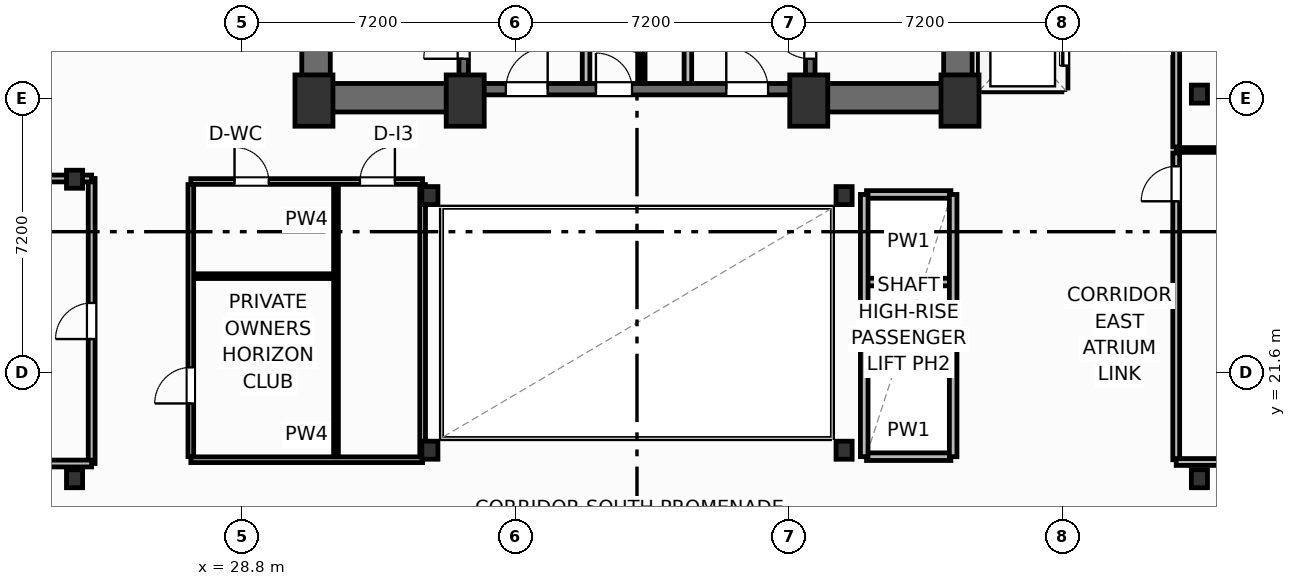
"""IFC4 building model, lengths in metres.
Left out: names, types, materials, properties, quantities, classifications, styles, units other than length and angle.
Written with IfcOpenShell. Run it as: python <this file> out.ifc"""

import sys

from ifc_helpers import new_model, si_unit, direction, frame, frame_2d, origin, origin_2d, place, context, subcontext, project, spatial, rectangle, i_section, extrude, element, fill, save


model = new_model("IFC4")
c1 = context("Model", 3, precision=1e-05, world=origin(), true_north=direction((0.0, 1.0)))
c2 = subcontext(c1, "Body", "Model", "MODEL_VIEW")
j1 = project(units=[si_unit("LENGTHUNIT", "METRE"), si_unit("PLANEANGLEUNIT", "RADIAN")], contexts=[c1])
p1 = place(None, origin())
s1 = spatial("IfcSite", under=j1, at=p1, CompositionType="ELEMENT")
p2 = place(p1, origin())
s2 = spatial("IfcBuilding", under=s1, at=p2, CompositionType="ELEMENT")
p3 = place(p2, frame((0.0, 0.0, 121.7)))
s3 = spatial("IfcBuildingStorey", under=s2, at=p3, CompositionType="ELEMENT", Elevation=121.7)
for number, where, z_axis, x_axis in (
    (1, (30.7, 28.75, 0.0), (0.0, 0.0, 1.0), (1.0, 0.0, 0.0)),
    (2, (34.68, 28.75, 0.0), (0.0, 0.0, 1.0), (1.0, 0.0, 0.0)),
    (3, (43.72, 28.75, 0.0), (0.0, 0.0, 1.0), (1.0, 0.0, 0.0)),
    (4, (47.7, 28.75, 0.0), (0.0, 0.0, 1.0), (1.0, 0.0, 0.0)),
):
    element("IfcColumn", number, at=place(p3, frame(where, z_axis=z_axis, x_axis=x_axis)), inside=s3, PredefinedType="COLUMN", context=c2, shape_type="SweptSolid", body=[
        extrude(rectangle(XDim=1.0, YDim=1.35, at=origin_2d()), origin(), (0.0, 0.0, 1.0), 3.7),
    ])
for number, where, z_axis, x_axis in (
    (5, (33.75, 19.55, 0.0), (0.0, 0.0, 1.0), (1.0, 0.0, 0.0)),
    (6, (44.65, 19.55, 0.0), (0.0, 0.0, 1.0), (1.0, 0.0, 0.0)),
    (7, (33.75, 26.25, 0.0), (0.0, 0.0, 1.0), (1.0, 0.0, 0.0)),
    (8, (44.65, 26.25, 0.0), (0.0, 0.0, 1.0), (1.0, 0.0, 0.0)),
    (9, (24.4, 18.8, 0.0), (0.0, 0.0, 1.0), (1.0, 0.0, 0.0)),
    (10, (24.4, 26.68, 0.0), (0.0, 0.0, 1.0), (1.0, 0.0, 0.0)),
    (11, (54.0, 18.8, 0.0), (0.0, 0.0, 1.0), (1.0, 0.0, 0.0)),
    (12, (54.0, 28.92, 0.0), (0.0, 0.0, 1.0), (1.0, 0.0, 0.0)),
):
    element("IfcColumn", number, at=place(p3, frame(where, z_axis=z_axis, x_axis=x_axis)), inside=s3, PredefinedType="COLUMN", context=c2, shape_type="SweptSolid", body=[
        extrude(i_section(OverallWidth=0.424, OverallDepth=0.474, WebThickness=0.048, FlangeThickness=0.077, FilletRadius=0.025, at=origin_2d()), origin(), (0.0, 0.0, 1.0), 3.7),
    ])
for number, where, z_axis, x_axis in (
    (13, (30.755, 29.2, 0.0), (0.0, 0.0, 1.0), (0.0, 1.0, 0.0)),
    (14, (47.645, 29.2, 0.0), (0.0, 0.0, 1.0), (0.0, 1.0, 0.0)),
):
    element("IfcWall", number, at=place(p3, frame(where, z_axis=z_axis, x_axis=x_axis)), inside=s3, PredefinedType="SHEAR", context=c2, shape_type="SweptSolid", body=[
        extrude(rectangle(XDim=9.22, YDim=0.75, at=frame_2d((4.61, 0.0))), origin(), (0.0, 0.0, 1.0), 3.45),
    ])
p4 = place(p3, frame((30.38, 28.825, 0.0), z_axis=(0.0, 0.0, 1.0), x_axis=(1.0, 0.0, 0.0)))
e15 = element("IfcWall", 15, at=p4, inside=s3, PredefinedType="SHEAR", context=c2, shape_type="SweptSolid", body=[
    extrude(rectangle(XDim=4.42, YDim=0.75, at=frame_2d((2.21, 0.0))), origin(), (0.0, 0.0, 1.0), 3.45),
])
p5 = place(p3, frame((43.6, 28.825, 0.0), z_axis=(0.0, 0.0, 1.0), x_axis=(1.0, 0.0, 0.0)))
e16 = element("IfcWall", 16, at=p5, inside=s3, PredefinedType="SHEAR", context=c2, shape_type="SweptSolid", body=[
    extrude(rectangle(XDim=4.42, YDim=0.75, at=frame_2d((2.21, 0.0))), origin(), (0.0, 0.0, 1.0), 3.45),
])
p6 = place(p3, frame((34.8, 29.05, 0.0), z_axis=(0.0, 0.0, 1.0), x_axis=(1.0, 0.0, 0.0)))
e17 = element("IfcWall", 17, at=p6, inside=s3, PredefinedType="SHEAR", context=c2, shape_type="SweptSolid", body=[
    extrude(rectangle(XDim=8.8, YDim=0.3, at=frame_2d((4.4, 0.0))), origin(), (0.0, 0.0, 1.0), 3.45),
])
p7 = place(p6, frame((0.95, 0.0, 0.0)))
e18 = element("IfcOpeningElement", 18, at=p7, cuts=e17, PredefinedType="OPENING", context=c2, shape_type="SweptSolid", body=[
    extrude(rectangle(XDim=1.1, YDim=2.15, at=frame_2d((0.55, 1.075))), frame((0.0, 0.16, 0.0), z_axis=(0.0, -1.0, 0.0), x_axis=(1.0, 0.0, 0.0)), (0.0, 0.0, 1.0), 0.32),
])
p8 = place(p6, frame((6.75, 0.0, 0.0)))
e19 = element("IfcOpeningElement", 19, at=p8, cuts=e17, PredefinedType="OPENING", context=c2, shape_type="SweptSolid", body=[
    extrude(rectangle(XDim=1.1, YDim=2.15, at=frame_2d((0.55, 1.075))), frame((0.0, 0.16, 0.0), z_axis=(0.0, -1.0, 0.0), x_axis=(1.0, 0.0, 0.0)), (0.0, 0.0, 1.0), 0.32),
])
p9 = place(p6, frame((3.32, 0.0, 0.0)))
e20 = element("IfcOpeningElement", 20, at=p9, cuts=e17, PredefinedType="OPENING", context=c2, shape_type="SweptSolid", body=[
    extrude(rectangle(XDim=0.95, YDim=2.15, at=frame_2d((0.475, 1.075))), frame((0.0, 0.16, 0.0), z_axis=(0.0, -1.0, 0.0), x_axis=(1.0, 0.0, 0.0)), (0.0, 0.0, 1.0), 0.32),
])
p10 = place(p3, frame((34.64, 29.2, 0.0), z_axis=(0.0, 0.0, 1.0), x_axis=(0.0, 1.0, 0.0)))
e21 = element("IfcWall", 21, at=p10, inside=s3, PredefinedType="SHEAR", context=c2, shape_type="SweptSolid", body=[
    extrude(rectangle(XDim=9.22, YDim=0.25, at=frame_2d((4.61, 0.0))), origin(), (0.0, 0.0, 1.0), 3.45),
])
p11 = place(p10, frame((0.65, 0.0, 0.0)))
e22 = element("IfcOpeningElement", 22, at=p11, cuts=e21, PredefinedType="OPENING", context=c2, shape_type="SweptSolid", body=[
    extrude(rectangle(XDim=1.05, YDim=2.15, at=frame_2d((0.525, 1.075))), frame((0.0, 0.135, 0.0), z_axis=(0.0, -1.0, 0.0), x_axis=(1.0, 0.0, 0.0)), (0.0, 0.0, 1.0), 0.27),
])
p12 = place(p3, frame((43.76, 29.2, 0.0), z_axis=(0.0, 0.0, 1.0), x_axis=(0.0, 1.0, 0.0)))
e23 = element("IfcWall", 23, at=p12, inside=s3, PredefinedType="SHEAR", context=c2, shape_type="SweptSolid", body=[
    extrude(rectangle(XDim=9.22, YDim=0.25, at=frame_2d((4.61, 0.0))), origin(), (0.0, 0.0, 1.0), 3.45),
])
p13 = place(p12, frame((0.65, 0.0, 0.0)))
e24 = element("IfcOpeningElement", 24, at=p13, cuts=e23, PredefinedType="OPENING", context=c2, shape_type="SweptSolid", body=[
    extrude(rectangle(XDim=1.05, YDim=2.15, at=frame_2d((0.525, 1.075))), frame((0.0, 0.135, 0.0), z_axis=(0.0, -1.0, 0.0), x_axis=(1.0, 0.0, 0.0)), (0.0, 0.0, 1.0), 0.27),
])
p14 = place(p3, frame((24.85, 19.2, 0.0), z_axis=(0.0, 0.0, 1.0), x_axis=(0.0, 1.0, 0.0)))
e25 = element("IfcWall", 25, at=p14, inside=s3, PredefinedType="PARTITIONING", context=c2, shape_type="SweptSolid", body=[
    extrude(rectangle(XDim=7.5, YDim=0.18, at=frame_2d((3.75, 0.0))), origin(), (0.0, 0.0, 1.0), 3.45),
])
p15 = place(p14, frame((3.275, 0.0, 0.0)))
e26 = element("IfcOpeningElement", 26, at=p15, cuts=e25, PredefinedType="OPENING", context=c2, shape_type="SweptSolid", body=[
    extrude(rectangle(XDim=0.95, YDim=2.05, at=frame_2d((0.475, 1.025))), frame((0.0, 0.1, 0.0), z_axis=(0.0, -1.0, 0.0), x_axis=(1.0, 0.0, 0.0)), (0.0, 0.0, 1.0), 0.2),
])
p16 = place(p3, frame((1.169, 19.2, 0.0), z_axis=(0.0, 0.0, 1.0), x_axis=(1.0, 0.0, 0.0)))
e27 = element("IfcWall", 27, at=p16, inside=s3, PredefinedType="PARTITIONING", context=c2, shape_type="SweptSolid", body=[
    extrude(rectangle(XDim=23.681, YDim=0.18, at=frame_2d((11.84, 0.0))), origin(), (0.0, 0.0, 1.0), 3.45),
])
p17 = place(p3, frame((2.078, 26.7, 0.0), z_axis=(0.0, 0.0, 1.0), x_axis=(1.0, 0.0, 0.0)))
e28 = element("IfcWall", 28, at=p17, inside=s3, PredefinedType="PARTITIONING", context=c2, shape_type="SweptSolid", body=[
    extrude(rectangle(XDim=22.772, YDim=0.18, at=frame_2d((11.386, 0.0))), origin(), (0.0, 0.0, 1.0), 2.662),
])
p18 = place(p3, frame((53.39, 19.3, 0.0), z_axis=(0.0, 0.0, 1.0), x_axis=(0.0, 1.0, 0.0)))
e29 = element("IfcWall", 29, at=p18, inside=s3, PredefinedType="PARTITIONING", context=c2, shape_type="SweptSolid", body=[
    extrude(rectangle(XDim=8.07, YDim=0.18, at=frame_2d((4.035, 0.0))), origin(), (0.0, 0.0, 1.0), 3.45),
])
p19 = place(p18, frame((6.8, 0.0, 0.0)))
e30 = element("IfcOpeningElement", 30, at=p19, cuts=e29, PredefinedType="OPENING", context=c2, shape_type="SweptSolid", body=[
    extrude(rectangle(XDim=0.92, YDim=2.05, at=frame_2d((0.46, 1.025))), frame((0.0, 0.1, 0.0), z_axis=(0.0, -1.0, 0.0), x_axis=(1.0, 0.0, 0.0)), (0.0, 0.0, 1.0), 0.2),
])
p20 = place(p3, frame((53.39, 27.53, 0.0), z_axis=(0.0, 0.0, 1.0), x_axis=(0.0, 1.0, 0.0)))
e31 = element("IfcWall", 31, at=p20, inside=s3, PredefinedType="PARTITIONING", context=c2, shape_type="SweptSolid", body=[
    extrude(rectangle(XDim=11.67, YDim=0.18, at=frame_2d((5.835, 0.0))), origin(), (0.0, 0.0, 1.0), 3.45),
])
p21 = place(p20, frame((5.8, 0.0, 0.0)))
e32 = element("IfcOpeningElement", 32, at=p21, cuts=e31, PredefinedType="OPENING", context=c2, shape_type="SweptSolid", body=[
    extrude(rectangle(XDim=0.92, YDim=2.05, at=frame_2d((0.46, 1.025))), frame((0.0, 0.1, 0.0), z_axis=(0.0, -1.0, 0.0), x_axis=(1.0, 0.0, 0.0)), (0.0, 0.0, 1.0), 0.2),
])
p22 = place(p3, frame((53.39, 27.45, 0.0), z_axis=(0.0, 0.0, 1.0), x_axis=(1.0, 0.0, 0.0)))
e33 = element("IfcWall", 33, at=p22, inside=s3, PredefinedType="PARTITIONING", context=c2, shape_type="SweptSolid", body=[
    extrude(rectangle(XDim=23.362, YDim=0.125, at=frame_2d((11.681, 0.0))), origin(), (0.0, 0.0, 1.0), 3.45),
])
p23 = place(p3, frame((53.39, 19.24, 0.0), z_axis=(0.0, 0.0, 1.0), x_axis=(1.0, 0.0, 0.0)))
e34 = element("IfcWall", 34, at=p23, inside=s3, PredefinedType="PARTITIONING", context=c2, shape_type="SweptSolid", body=[
    extrude(rectangle(XDim=22.367, YDim=0.18, at=frame_2d((11.183, 0.0))), origin(), (0.0, 0.0, 1.0), 2.662),
])
for number, where, z_axis, x_axis in (
    (35, (37.86, 29.2, 0.0), (0.0, 0.0, 1.0), (0.0, 1.0, 0.0)),
    (36, (40.54, 29.2, 0.0), (0.0, 0.0, 1.0), (0.0, 1.0, 0.0)),
):
    element("IfcWall", number, at=place(p3, frame(where, z_axis=z_axis, x_axis=x_axis)), inside=s3, PredefinedType="PARTITIONING", context=c2, shape_type="SweptSolid", body=[
        extrude(rectangle(XDim=5.18, YDim=0.2, at=frame_2d((2.59, 0.0))), origin(), (0.0, 0.0, 1.0), 3.45),
    ])
p24 = place(p3, frame((39.35, 29.2, 0.0), z_axis=(0.0, 0.0, 1.0), x_axis=(0.0, 1.0, 0.0)))
e37 = element("IfcWall", 37, at=p24, inside=s3, PredefinedType="PARTITIONING", context=c2, shape_type="SweptSolid", body=[
    extrude(rectangle(XDim=5.22, YDim=0.125, at=frame_2d((2.61, 0.0))), origin(), (0.0, 0.0, 1.0), 3.45),
])
p25 = place(p24, frame((0.8, 0.0, 0.0)))
e38 = element("IfcOpeningElement", 38, at=p25, cuts=e37, PredefinedType="OPENING", context=c2, shape_type="SweptSolid", body=[
    extrude(rectangle(XDim=0.85, YDim=2.05, at=frame_2d((0.425, 1.025))), frame((0.0, 0.073, 0.0), z_axis=(0.0, -1.0, 0.0), x_axis=(1.0, 0.0, 0.0)), (0.0, 0.0, 1.0), 0.145),
])
p26 = place(p24, frame((3.4, 0.0, 0.0)))
e39 = element("IfcOpeningElement", 39, at=p26, cuts=e37, PredefinedType="OPENING", context=c2, shape_type="SweptSolid", body=[
    extrude(rectangle(XDim=0.85, YDim=2.05, at=frame_2d((0.425, 1.025))), frame((0.0, 0.073, 0.0), z_axis=(0.0, -1.0, 0.0), x_axis=(1.0, 0.0, 0.0)), (0.0, 0.0, 1.0), 0.145),
])
p27 = place(p3, frame((27.46, 19.3, 0.0), z_axis=(0.0, 0.0, 1.0), x_axis=(1.0, 0.0, 0.0)))
e40 = element("IfcWall", 40, at=p27, inside=s3, PredefinedType="PARTITIONING", context=c2, shape_type="SweptSolid", body=[
    extrude(rectangle(XDim=6.1, YDim=0.15, at=frame_2d((3.05, 0.0))), origin(), (0.0, 0.0, 1.0), 2.662),
])
p28 = place(p3, frame((27.46, 26.62, 0.0), z_axis=(0.0, 0.0, 1.0), x_axis=(1.0, 0.0, 0.0)))
e41 = element("IfcWall", 41, at=p28, inside=s3, PredefinedType="PARTITIONING", context=c2, shape_type="SweptSolid", body=[
    extrude(rectangle(XDim=6.1, YDim=0.15, at=frame_2d((3.05, 0.0))), origin(), (0.0, 0.0, 1.0), 2.662),
])
p29 = place(p28, frame((1.15, 0.0, 0.0)))
e42 = element("IfcOpeningElement", 42, at=p29, cuts=e41, PredefinedType="OPENING", context=c2, shape_type="SweptSolid", body=[
    extrude(rectangle(XDim=0.9, YDim=2.05, at=frame_2d((0.45, 1.025))), frame((0.0, 0.085, 0.0), z_axis=(0.0, -1.0, 0.0), x_axis=(1.0, 0.0, 0.0)), (0.0, 0.0, 1.0), 0.17),
])
p30 = place(p28, frame((4.45, 0.0, 0.0)))
e43 = element("IfcOpeningElement", 43, at=p30, cuts=e41, PredefinedType="OPENING", context=c2, shape_type="SweptSolid", body=[
    extrude(rectangle(XDim=0.92, YDim=2.05, at=frame_2d((0.46, 1.025))), frame((0.0, 0.085, 0.0), z_axis=(0.0, -1.0, 0.0), x_axis=(1.0, 0.0, 0.0)), (0.0, 0.0, 1.0), 0.17),
])
p31 = place(p3, frame((31.28, 19.38, 0.0), z_axis=(0.0, 0.0, 1.0), x_axis=(0.0, 1.0, 0.0)))
e44 = element("IfcWall", 44, at=p31, inside=s3, PredefinedType="PARTITIONING", context=c2, shape_type="SweptSolid", body=[
    extrude(rectangle(XDim=7.16, YDim=0.125, at=frame_2d((3.58, 0.0))), origin(), (0.0, 0.0, 1.0), 3.45),
])
p32 = place(p3, frame((27.52, 24.13, 0.0), z_axis=(0.0, 0.0, 1.0), x_axis=(1.0, 0.0, 0.0)))
e45 = element("IfcWall", 45, at=p32, inside=s3, PredefinedType="PARTITIONING", context=c2, shape_type="SweptSolid", body=[
    extrude(rectangle(XDim=3.7, YDim=0.125, at=frame_2d((1.85, 0.0))), origin(), (0.0, 0.0, 1.0), 3.45),
])
p33 = place(p3, frame((27.46, 19.38, 0.0), z_axis=(0.0, 0.0, 1.0), x_axis=(0.0, 1.0, 0.0)))
e46 = element("IfcWall", 46, at=p33, inside=s3, PredefinedType="PARTITIONING", context=c2, shape_type="SweptSolid", body=[
    extrude(rectangle(XDim=7.16, YDim=0.15, at=frame_2d((3.58, 0.0))), origin(), (0.0, 0.0, 1.0), 3.45),
])
p34 = place(p33, frame((1.4, 0.0, 0.0)))
e47 = element("IfcOpeningElement", 47, at=p34, cuts=e46, PredefinedType="OPENING", context=c2, shape_type="SweptSolid", body=[
    extrude(rectangle(XDim=0.95, YDim=2.05, at=frame_2d((0.475, 1.025))), frame((0.0, 0.085, 0.0), z_axis=(0.0, -1.0, 0.0), x_axis=(1.0, 0.0, 0.0)), (0.0, 0.0, 1.0), 0.17),
])
p35 = place(p3, frame((33.56, 19.38, 0.0), z_axis=(0.0, 0.0, 1.0), x_axis=(0.0, 1.0, 0.0)))
e48 = element("IfcWall", 48, at=p35, inside=s3, PredefinedType="PARTITIONING", context=c2, shape_type="SweptSolid", body=[
    extrude(rectangle(XDim=7.16, YDim=0.15, at=frame_2d((3.58, 0.0))), origin(), (0.0, 0.0, 1.0), 2.824),
])
p36 = place(p3, frame((48.32, 29.08, 0.0), z_axis=(0.0, 0.0, 1.0), x_axis=(1.0, 0.0, 0.0)))
e49 = element("IfcWall", 49, at=p36, inside=s3, PredefinedType="PARTITIONING", context=c2, shape_type="SweptSolid", body=[
    extrude(rectangle(XDim=2.06, YDim=0.2, at=frame_2d((1.03, 0.0))), origin(), (0.0, 0.0, 1.0), 2.662),
])
p37 = place(p3, frame((48.28, 29.08, 0.0), z_axis=(0.0, 0.0, 1.0), x_axis=(0.0, 1.0, 0.0)))
e50 = element("IfcWall", 50, at=p37, inside=s3, PredefinedType="PARTITIONING", context=c2, shape_type="SweptSolid", body=[
    extrude(rectangle(XDim=6.89, YDim=0.2, at=frame_2d((3.445, 0.0))), origin(), (0.0, 0.0, 1.0), 3.45),
])
p38 = place(p3, frame((50.44, 29.08, 0.0), z_axis=(0.0, 0.0, 1.0), x_axis=(0.0, 1.0, 0.0)))
e51 = element("IfcWall", 51, at=p38, inside=s3, PredefinedType="PARTITIONING", context=c2, shape_type="SweptSolid", body=[
    extrude(rectangle(XDim=6.89, YDim=0.2, at=frame_2d((3.445, 0.0))), origin(), (0.0, 0.0, 1.0), 3.45),
])
p39 = place(p38, frame((0.59, 0.0, 0.0)))
e52 = element("IfcOpeningElement", 52, at=p39, cuts=e51, PredefinedType="OPENING", context=c2, shape_type="SweptSolid", body=[
    extrude(rectangle(XDim=1.1, YDim=2.15, at=frame_2d((0.55, 1.075))), frame((0.0, 0.11, 0.0), z_axis=(0.0, -1.0, 0.0), x_axis=(1.0, 0.0, 0.0)), (0.0, 0.0, 1.0), 0.22),
])
p40 = place(p38, frame((2.89, 0.0, 0.0)))
e53 = element("IfcOpeningElement", 53, at=p40, cuts=e51, PredefinedType="OPENING", context=c2, shape_type="SweptSolid", body=[
    extrude(rectangle(XDim=1.1, YDim=2.15, at=frame_2d((0.55, 1.075))), frame((0.0, 0.11, 0.0), z_axis=(0.0, -1.0, 0.0), x_axis=(1.0, 0.0, 0.0)), (0.0, 0.0, 1.0), 0.22),
])
p41 = place(p38, frame((5.19, 0.0, 0.0)))
e54 = element("IfcOpeningElement", 54, at=p41, cuts=e51, PredefinedType="OPENING", context=c2, shape_type="SweptSolid", body=[
    extrude(rectangle(XDim=1.1, YDim=2.15, at=frame_2d((0.55, 1.075))), frame((0.0, 0.11, 0.0), z_axis=(0.0, -1.0, 0.0), x_axis=(1.0, 0.0, 0.0)), (0.0, 0.0, 1.0), 0.22),
])
for number, where, z_axis, x_axis in (
    (55, (45.24, 21.675, 0.0), (0.0, 0.0, 1.0), (1.0, 0.0, 0.0)),
    (56, (45.24, 23.975, 0.0), (0.0, 0.0, 1.0), (1.0, 0.0, 0.0)),
):
    element("IfcWall", number, at=place(p3, frame(where, z_axis=z_axis, x_axis=x_axis)), inside=s3, PredefinedType="PARTITIONING", context=c2, shape_type="SweptSolid", body=[
        extrude(rectangle(XDim=2.22, YDim=0.2, at=frame_2d((1.11, 0.0))), origin(), (0.0, 0.0, 1.0), 3.45),
    ])
p42 = place(p3, frame((45.24, 19.38, 0.0), z_axis=(0.0, 0.0, 1.0), x_axis=(1.0, 0.0, 0.0)))
e57 = element("IfcWall", 57, at=p42, inside=s3, PredefinedType="PARTITIONING", context=c2, shape_type="SweptSolid", body=[
    extrude(rectangle(XDim=2.22, YDim=0.2, at=frame_2d((1.11, 0.0))), origin(), (0.0, 0.0, 1.0), 2.662),
])
p43 = place(p3, frame((45.24, 26.28, 0.0), z_axis=(0.0, 0.0, 1.0), x_axis=(1.0, 0.0, 0.0)))
e58 = element("IfcWall", 58, at=p43, inside=s3, PredefinedType="PARTITIONING", context=c2, shape_type="SweptSolid", body=[
    extrude(rectangle(XDim=2.22, YDim=0.2, at=frame_2d((1.11, 0.0))), origin(), (0.0, 0.0, 1.0), 3.45),
])
for number, where, z_axis, x_axis in (
    (59, (45.18, 19.38, 0.0), (0.0, 0.0, 1.0), (0.0, 1.0, 0.0)),
    (60, (47.52, 19.38, 0.0), (0.0, 0.0, 1.0), (0.0, 1.0, 0.0)),
):
    element("IfcWall", number, at=place(p3, frame(where, z_axis=z_axis, x_axis=x_axis)), inside=s3, PredefinedType="PARTITIONING", context=c2, shape_type="SweptSolid", body=[
        extrude(rectangle(XDim=6.9, YDim=0.2, at=frame_2d((3.45, 0.0))), origin(), (0.0, 0.0, 1.0), 3.45),
    ])
p44 = place(p15, origin())
e61 = element("IfcDoor", 61, at=p44, inside=s3, OperationType="SINGLE_SWING_LEFT", PredefinedType="DOOR", context=c2, shape_type="SweptSolid", body=[
    extrude(rectangle(XDim=0.95, YDim=2.05, at=frame_2d((0.475, 1.025))), frame((0.0, 0.025, 0.0), z_axis=(0.0, -1.0, 0.0), x_axis=(1.0, 0.0, 0.0)), (0.0, 0.0, 1.0), 0.05),
])
fill(e26, e61)
p45 = place(p19, origin())
e62 = element("IfcDoor", 62, at=p45, inside=s3, OperationType="SINGLE_SWING_LEFT", PredefinedType="DOOR", context=c2, shape_type="SweptSolid", body=[
    extrude(rectangle(XDim=0.92, YDim=2.05, at=frame_2d((0.46, 1.025))), frame((0.0, 0.025, 0.0), z_axis=(0.0, -1.0, 0.0), x_axis=(1.0, 0.0, 0.0)), (0.0, 0.0, 1.0), 0.05),
])
fill(e30, e62)
p46 = place(p11, origin())
e63 = element("IfcDoor", 63, at=p46, inside=s3, OperationType="SINGLE_SWING_LEFT", PredefinedType="DOOR", context=c2, shape_type="SweptSolid", body=[
    extrude(rectangle(XDim=1.05, YDim=2.15, at=frame_2d((0.525, 1.075))), frame((0.0, 0.025, 0.0), z_axis=(0.0, -1.0, 0.0), x_axis=(1.0, 0.0, 0.0)), (0.0, 0.0, 1.0), 0.05),
])
fill(e22, e63)
p47 = place(p13, origin())
e64 = element("IfcDoor", 64, at=p47, inside=s3, OperationType="SINGLE_SWING_RIGHT", PredefinedType="DOOR", context=c2, shape_type="SweptSolid", body=[
    extrude(rectangle(XDim=1.05, YDim=2.15, at=frame_2d((0.525, 1.075))), frame((0.0, 0.025, 0.0), z_axis=(0.0, -1.0, 0.0), x_axis=(1.0, 0.0, 0.0)), (0.0, 0.0, 1.0), 0.05),
])
fill(e24, e64)
p48 = place(p7, origin())
e65 = element("IfcDoor", 65, at=p48, inside=s3, OperationType="SINGLE_SWING_RIGHT", PredefinedType="DOOR", context=c2, shape_type="SweptSolid", body=[
    extrude(rectangle(XDim=1.1, YDim=2.15, at=frame_2d((0.55, 1.075))), frame((0.0, 0.025, 0.0), z_axis=(0.0, -1.0, 0.0), x_axis=(1.0, 0.0, 0.0)), (0.0, 0.0, 1.0), 0.05),
])
fill(e18, e65)
p49 = place(p8, origin())
e66 = element("IfcDoor", 66, at=p49, inside=s3, OperationType="SINGLE_SWING_LEFT", PredefinedType="DOOR", context=c2, shape_type="SweptSolid", body=[
    extrude(rectangle(XDim=1.1, YDim=2.15, at=frame_2d((0.55, 1.075))), frame((0.0, 0.025, 0.0), z_axis=(0.0, -1.0, 0.0), x_axis=(1.0, 0.0, 0.0)), (0.0, 0.0, 1.0), 0.05),
])
fill(e19, e66)
p50 = place(p25, origin())
e67 = element("IfcDoor", 67, at=p50, inside=s3, OperationType="SINGLE_SWING_RIGHT", PredefinedType="DOOR", context=c2, shape_type="SweptSolid", body=[
    extrude(rectangle(XDim=0.85, YDim=2.05, at=frame_2d((0.425, 1.025))), frame((0.0, 0.025, 0.0), z_axis=(0.0, -1.0, 0.0), x_axis=(1.0, 0.0, 0.0)), (0.0, 0.0, 1.0), 0.05),
])
fill(e38, e67)
p51 = place(p9, origin())
e68 = element("IfcDoor", 68, at=p51, inside=s3, OperationType="SINGLE_SWING_LEFT", PredefinedType="DOOR", context=c2, shape_type="SweptSolid", body=[
    extrude(rectangle(XDim=0.95, YDim=2.15, at=frame_2d((0.475, 1.075))), frame((0.0, 0.025, 0.0), z_axis=(0.0, -1.0, 0.0), x_axis=(1.0, 0.0, 0.0)), (0.0, 0.0, 1.0), 0.05),
])
fill(e20, e68)
p52 = place(p29, origin())
e69 = element("IfcDoor", 69, at=p52, inside=s3, OperationType="SINGLE_SWING_LEFT", PredefinedType="DOOR", context=c2, shape_type="SweptSolid", body=[
    extrude(rectangle(XDim=0.9, YDim=2.05, at=frame_2d((0.45, 1.025))), frame((0.0, 0.025, 0.0), z_axis=(0.0, -1.0, 0.0), x_axis=(1.0, 0.0, 0.0)), (0.0, 0.0, 1.0), 0.05),
])
fill(e42, e69)
p53 = place(p30, origin())
e70 = element("IfcDoor", 70, at=p53, inside=s3, OperationType="SINGLE_SWING_RIGHT", PredefinedType="DOOR", context=c2, shape_type="SweptSolid", body=[
    extrude(rectangle(XDim=0.92, YDim=2.05, at=frame_2d((0.46, 1.025))), frame((0.0, 0.025, 0.0), z_axis=(0.0, -1.0, 0.0), x_axis=(1.0, 0.0, 0.0)), (0.0, 0.0, 1.0), 0.05),
])
fill(e43, e70)
p54 = place(p34, origin())
e71 = element("IfcDoor", 71, at=p54, inside=s3, OperationType="SINGLE_SWING_LEFT", PredefinedType="DOOR", context=c2, shape_type="SweptSolid", body=[
    extrude(rectangle(XDim=0.95, YDim=2.05, at=frame_2d((0.475, 1.025))), frame((0.0, 0.025, 0.0), z_axis=(0.0, -1.0, 0.0), x_axis=(1.0, 0.0, 0.0)), (0.0, 0.0, 1.0), 0.05),
])
fill(e47, e71)
p55 = place(p39, origin())
e72 = element("IfcDoor", 72, at=p55, inside=s3, OperationType="SLIDING_TO_LEFT", PredefinedType="DOOR", context=c2, shape_type="SweptSolid", body=[
    extrude(rectangle(XDim=1.1, YDim=2.15, at=frame_2d((0.55, 1.075))), frame((0.0, 0.025, 0.0), z_axis=(0.0, -1.0, 0.0), x_axis=(1.0, 0.0, 0.0)), (0.0, 0.0, 1.0), 0.05),
])
fill(e52, e72)
save(model, sys.argv[1])
